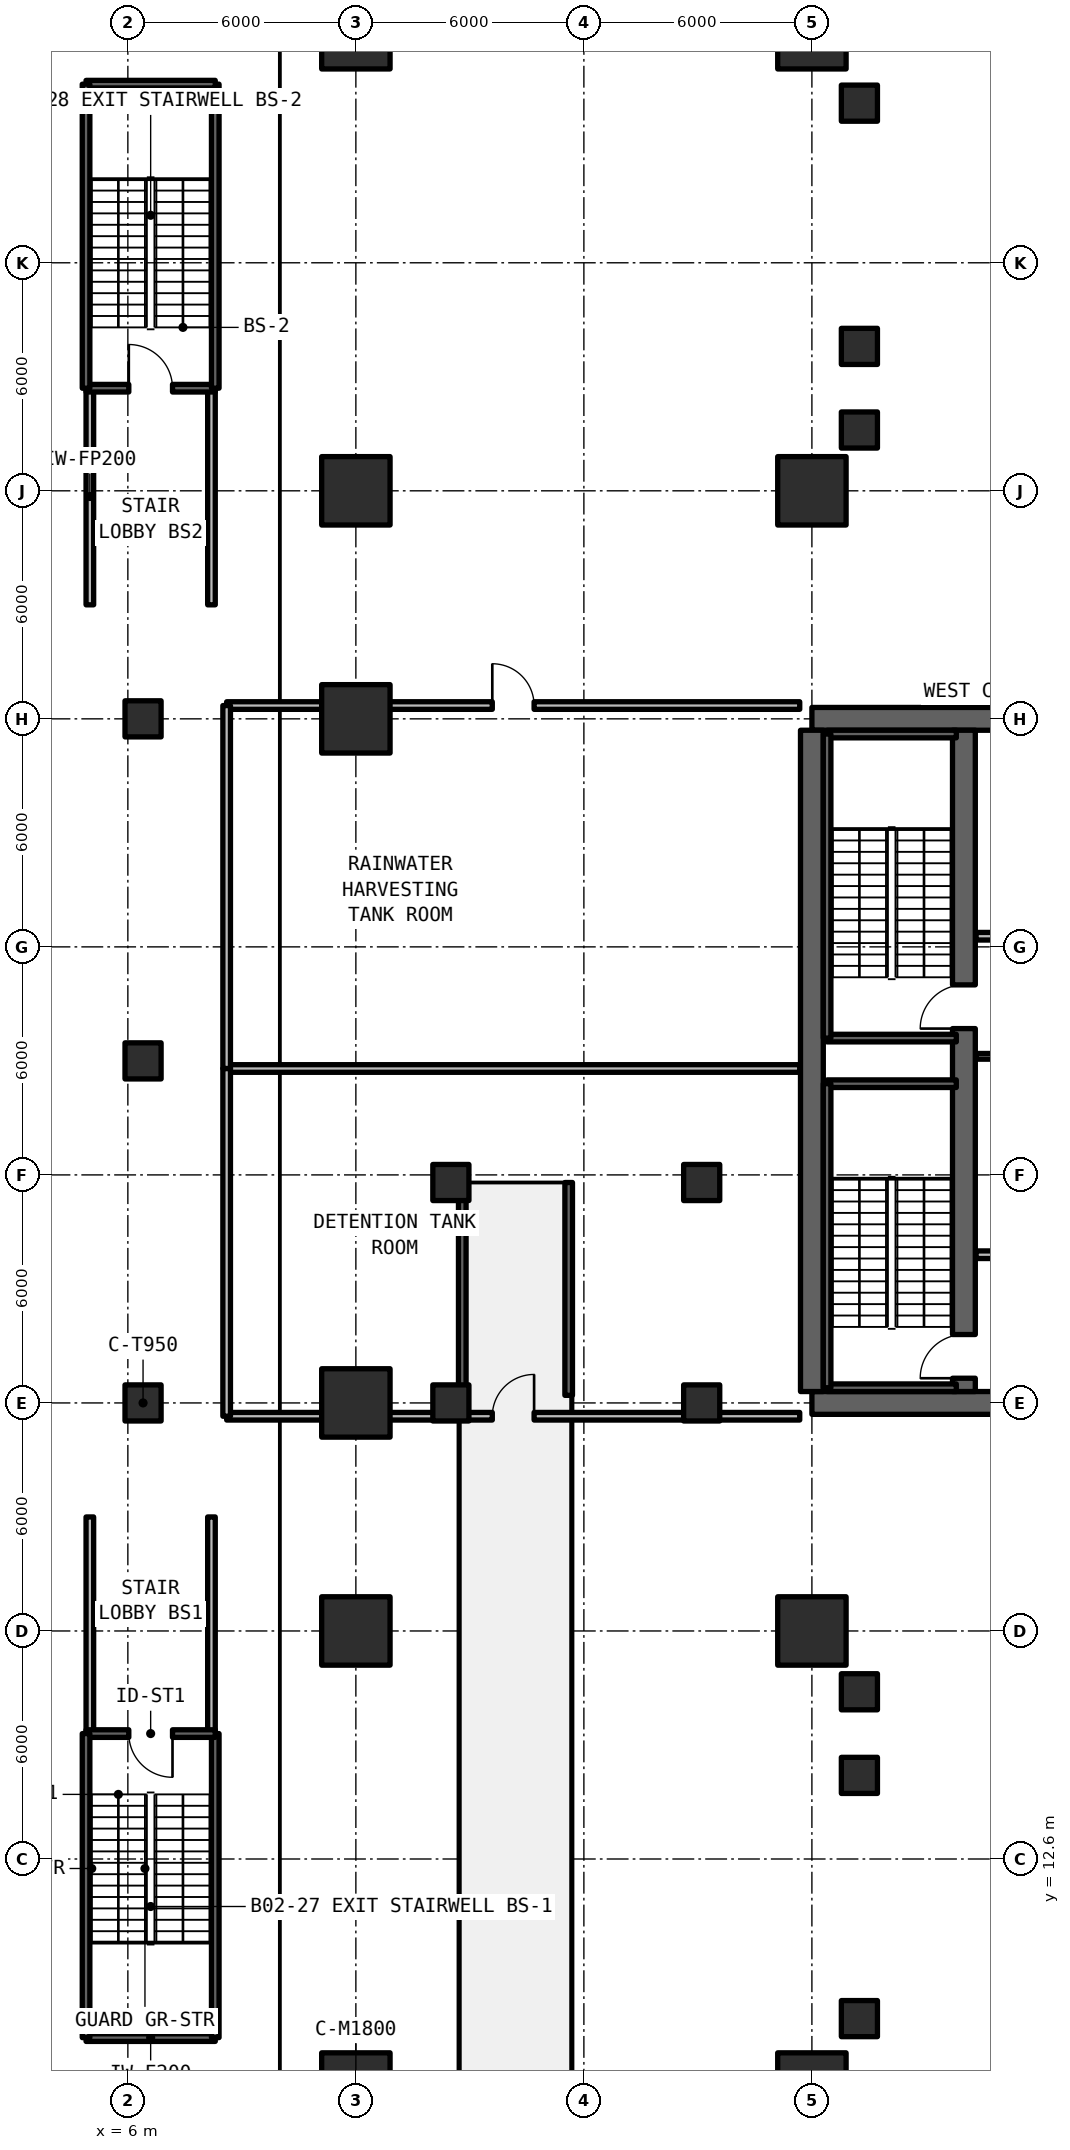
"""IFC4 building model, lengths in metres.
Left out: names, types, materials, properties, quantities, classifications, styles, units other than length and angle.
Written with IfcOpenShell. Run it as: python <this file> out.ifc"""

import sys

from ifc_helpers import new_model, si_unit, direction, frame, frame_2d, origin, origin_2d, place, context, subcontext, project, spatial, rectangle, extrude, element, fill, save


model = new_model("IFC4")
c1 = context("Model", 3, precision=1e-05, world=origin(), true_north=direction((0.0, 1.0)))
c2 = subcontext(c1, "Body", "Model", "MODEL_VIEW")
j1 = project(units=[si_unit("LENGTHUNIT", "METRE"), si_unit("PLANEANGLEUNIT", "RADIAN")], contexts=[c1])
p1 = place(None, origin())
s1 = spatial("IfcSite", under=j1, at=p1, CompositionType="ELEMENT")
p2 = place(p1, origin())
s2 = spatial("IfcBuilding", under=s1, at=p2, CompositionType="ELEMENT")
p3 = place(p2, frame((0.0, 0.0, -9.24)))
s3 = spatial("IfcBuildingStorey", under=s2, at=p3, CompositionType="ELEMENT", Elevation=-9.24)
for number, where, z_axis, x_axis in (
    (1, (24.0, 24.6, 0.0), (0.0, 0.0, 1.0), (1.0, 0.0, 0.0)),
    (2, (36.0, 42.6, 0.0), (0.0, 0.0, 1.0), (-1.0, 0.0, 0.0)),
):
    element("IfcWall", number, at=place(p3, frame(where, z_axis=z_axis, x_axis=x_axis)), inside=s3, PredefinedType="SHEAR", context=c2, shape_type="SweptSolid", body=[
        extrude(rectangle(XDim=12.0, YDim=0.6, at=frame_2d((6.0, 0.0))), origin(), (0.0, 0.0, 1.0), 4.62),
    ])
p4 = place(p3, frame((24.0, 24.9, 0.0), z_axis=(0.0, 0.0, 1.0), x_axis=(0.0, 1.0, 0.0)))
e3 = element("IfcWall", 3, at=p4, inside=s3, PredefinedType="SHEAR", context=c2, shape_type="SweptSolid", body=[
    extrude(rectangle(XDim=17.4, YDim=0.6, at=frame_2d((8.7, 0.0))), origin(), (0.0, 0.0, 1.0), 4.62),
])
p5 = place(p3, frame((28.0, 24.9, 0.0), z_axis=(0.0, 0.0, 1.0), x_axis=(0.0, 1.0, 0.0)))
e4 = element("IfcWall", 4, at=p5, inside=s3, PredefinedType="SHEAR", context=c2, shape_type="SweptSolid", body=[
    extrude(rectangle(XDim=17.4, YDim=0.6, at=frame_2d((8.7, 0.0))), origin(), (0.0, 0.0, 1.0), 4.62),
])
p6 = place(p5, frame((0.35, 0.0, 0.0)))
e5 = element("IfcOpeningElement", 5, at=p6, cuts=e4, PredefinedType="OPENING", context=c2, shape_type="SweptSolid", body=[
    extrude(rectangle(XDim=1.15, YDim=2.15, at=frame_2d((0.575, 1.075))), frame((0.0, 0.31, 0.0), z_axis=(0.0, -1.0, 0.0), x_axis=(1.0, 0.0, 0.0)), (0.0, 0.0, 1.0), 0.62),
])
p7 = place(p5, frame((9.55, 0.0, 0.0)))
e6 = element("IfcOpeningElement", 6, at=p7, cuts=e4, PredefinedType="OPENING", context=c2, shape_type="SweptSolid", body=[
    extrude(rectangle(XDim=1.15, YDim=2.15, at=frame_2d((0.575, 1.075))), frame((0.0, 0.31, 0.0), z_axis=(0.0, -1.0, 0.0), x_axis=(1.0, 0.0, 0.0)), (0.0, 0.0, 1.0), 0.62),
])
for number, where, z_axis, x_axis in (
    (7, (12.0, 6.6, 0.0), (0.0, 0.0, 1.0), (1.0, 0.0, 0.0)),
    (8, (12.0, 24.6, 0.0), (0.0, 0.0, 1.0), (1.0, 0.0, 0.0)),
    (9, (12.0, 42.6, 0.0), (0.0, 0.0, 1.0), (1.0, 0.0, 0.0)),
    (10, (12.0, 60.6, 0.0), (0.0, 0.0, 1.0), (1.0, 0.0, 0.0)),
    (11, (24.0, 6.6, 0.0), (0.0, 0.0, 1.0), (1.0, 0.0, 0.0)),
    (12, (24.0, 60.6, 0.0), (0.0, 0.0, 1.0), (1.0, 0.0, 0.0)),
    (13, (12.0, 18.6, 0.0), (0.0, 0.0, 1.0), (1.0, 0.0, 0.0)),
    (14, (12.0, 48.6, 0.0), (0.0, 0.0, 1.0), (1.0, 0.0, 0.0)),
    (15, (24.0, 18.6, 0.0), (0.0, 0.0, 1.0), (1.0, 0.0, 0.0)),
    (16, (24.0, 48.6, 0.0), (0.0, 0.0, 1.0), (1.0, 0.0, 0.0)),
):
    element("IfcColumn", number, at=place(p3, frame(where, z_axis=z_axis, x_axis=x_axis)), inside=s3, PredefinedType="COLUMN", context=c2, shape_type="SweptSolid", body=[
        extrude(rectangle(XDim=1.8, YDim=1.8, at=origin_2d()), origin(), (0.0, 0.0, 1.0), 4.62),
    ])
for number, where, z_axis, x_axis in (
    (17, (6.4, 24.6, 0.0), (0.0, 0.0, 1.0), (1.0, 0.0, 0.0)),
    (18, (6.4, 42.6, 0.0), (0.0, 0.0, 1.0), (1.0, 0.0, 0.0)),
    (19, (6.4, 33.6, 0.0), (0.0, 0.0, 1.0), (1.0, 0.0, 0.0)),
    (20, (14.5, 30.4, 0.0), (0.0, 0.0, 1.0), (1.0, 0.0, 0.0)),
    (21, (21.1, 30.4, 0.0), (0.0, 0.0, 1.0), (1.0, 0.0, 0.0)),
    (22, (14.5, 24.6, 0.0), (0.0, 0.0, 1.0), (1.0, 0.0, 0.0)),
    (23, (21.1, 24.6, 0.0), (0.0, 0.0, 1.0), (1.0, 0.0, 0.0)),
    (24, (25.25, 14.8, 0.0), (0.0, 0.0, 1.0), (1.0, 0.0, 0.0)),
    (25, (25.25, 8.4, 0.0), (0.0, 0.0, 1.0), (1.0, 0.0, 0.0)),
    (26, (25.25, 17.0, 0.0), (0.0, 0.0, 1.0), (1.0, 0.0, 0.0)),
    (27, (25.25, 52.4, 0.0), (0.0, 0.0, 1.0), (1.0, 0.0, 0.0)),
    (28, (25.25, 50.2, 0.0), (0.0, 0.0, 1.0), (1.0, 0.0, 0.0)),
    (29, (25.25, 58.8, 0.0), (0.0, 0.0, 1.0), (1.0, 0.0, 0.0)),
):
    element("IfcColumn", number, at=place(p3, frame(where, z_axis=z_axis, x_axis=x_axis)), inside=s3, PredefinedType="COLUMN", context=c2, shape_type="SweptSolid", body=[
        extrude(rectangle(XDim=0.95, YDim=0.95, at=origin_2d()), origin(), (0.0, 0.0, 1.0), 4.62),
    ])
p8 = place(p3, frame((28.32, 28.5, 0.0), z_axis=(0.0, 0.0, 1.0), x_axis=(1.0, 0.0, 0.0)))
e30 = element("IfcWall", 30, at=p8, inside=s3, PredefinedType="SOLIDWALL", context=c2, shape_type="SweptSolid", body=[
    extrude(rectangle(XDim=7.36, YDim=0.2, at=frame_2d((3.68, 0.0))), origin(), (0.0, 0.0, 1.0), 3.54),
])
p9 = place(p8, frame((2.88, 0.0, 0.0)))
e31 = element("IfcOpeningElement", 31, at=p9, cuts=e30, PredefinedType="OPENING", context=c2, shape_type="SweptSolid", body=[
    extrude(rectangle(XDim=1.0, YDim=2.15, at=frame_2d((0.5, 1.075))), frame((0.0, 0.11, 0.0), z_axis=(0.0, -1.0, 0.0), x_axis=(1.0, 0.0, 0.0)), (0.0, 0.0, 1.0), 0.22),
])
p10 = place(p3, frame((28.32, 33.72, 0.0), z_axis=(0.0, 0.0, 1.0), x_axis=(1.0, 0.0, 0.0)))
e32 = element("IfcWall", 32, at=p10, inside=s3, PredefinedType="SOLIDWALL", context=c2, shape_type="SweptSolid", body=[
    extrude(rectangle(XDim=2.48, YDim=0.15, at=frame_2d((1.24, 0.0))), origin(), (0.0, 0.0, 1.0), 3.54),
])
p11 = place(p3, frame((28.32, 36.88, 0.0), z_axis=(0.0, 0.0, 1.0), x_axis=(1.0, 0.0, 0.0)))
e33 = element("IfcWall", 33, at=p11, inside=s3, PredefinedType="SOLIDWALL", context=c2, shape_type="SweptSolid", body=[
    extrude(rectangle(XDim=2.48, YDim=0.2, at=frame_2d((1.24, 0.0))), origin(), (0.0, 0.0, 1.0), 3.54),
])
for number, where, z_axis, x_axis in (
    (34, (5.0, 45.6, 0.0), (0.0, 0.0, 1.0), (0.0, 1.0, 0.0)),
    (35, (8.2, 45.6, 0.0), (0.0, 0.0, 1.0), (0.0, 1.0, 0.0)),
):
    element("IfcWall", number, at=place(p3, frame(where, z_axis=z_axis, x_axis=x_axis)), inside=s3, PredefinedType="SOLIDWALL", context=c2, shape_type="SweptSolid", body=[
        extrude(rectangle(XDim=5.7, YDim=0.2, at=frame_2d((2.85, 0.0))), origin(), (0.0, 0.0, 1.0), 3.54),
    ])
for number, where, z_axis, x_axis in (
    (36, (5.0, 15.9, 0.0), (0.0, 0.0, 1.0), (0.0, 1.0, 0.0)),
    (37, (8.2, 15.9, 0.0), (0.0, 0.0, 1.0), (0.0, 1.0, 0.0)),
):
    element("IfcWall", number, at=place(p3, frame(where, z_axis=z_axis, x_axis=x_axis)), inside=s3, PredefinedType="SOLIDWALL", context=c2, shape_type="SweptSolid", body=[
        extrude(rectangle(XDim=5.7, YDim=0.2, at=frame_2d((2.85, 0.0))), origin(), (0.0, 0.0, 1.0), 3.54),
    ])
p12 = place(p3, frame((8.6, 24.25, 0.0), z_axis=(0.0, 0.0, 1.0), x_axis=(1.0, 0.0, 0.0)))
e38 = element("IfcWall", 38, at=p12, inside=s3, PredefinedType="SOLIDWALL", context=c2, shape_type="SweptSolid", body=[
    extrude(rectangle(XDim=15.08, YDim=0.2, at=frame_2d((7.54, 0.0))), origin(), (0.0, 0.0, 1.0), 3.54),
])
p13 = place(p12, frame((6.99, 0.0, 0.0)))
e39 = element("IfcOpeningElement", 39, at=p13, cuts=e38, PredefinedType="OPENING", context=c2, shape_type="SweptSolid", body=[
    extrude(rectangle(XDim=1.1, YDim=2.15, at=frame_2d((0.55, 1.075))), frame((0.0, 0.11, 0.0), z_axis=(0.0, -1.0, 0.0), x_axis=(1.0, 0.0, 0.0)), (0.0, 0.0, 1.0), 0.22),
])
p14 = place(p3, frame((8.6, 33.4, 0.0), z_axis=(0.0, 0.0, 1.0), x_axis=(1.0, 0.0, 0.0)))
e40 = element("IfcWall", 40, at=p14, inside=s3, PredefinedType="SOLIDWALL", context=c2, shape_type="SweptSolid", body=[
    extrude(rectangle(XDim=15.08, YDim=0.2, at=frame_2d((7.54, 0.0))), origin(), (0.0, 0.0, 1.0), 3.54),
])
p15 = place(p3, frame((8.6, 24.25, 0.0), z_axis=(0.0, 0.0, 1.0), x_axis=(0.0, 1.0, 0.0)))
e41 = element("IfcWall", 41, at=p15, inside=s3, PredefinedType="SOLIDWALL", context=c2, shape_type="SweptSolid", body=[
    extrude(rectangle(XDim=9.15, YDim=0.2, at=frame_2d((4.575, 0.0))), origin(), (0.0, 0.0, 1.0), 3.54),
])
p16 = place(p3, frame((8.6, 42.95, 0.0), z_axis=(0.0, 0.0, 1.0), x_axis=(1.0, 0.0, 0.0)))
e42 = element("IfcWall", 42, at=p16, inside=s3, PredefinedType="SOLIDWALL", context=c2, shape_type="SweptSolid", body=[
    extrude(rectangle(XDim=15.08, YDim=0.2, at=frame_2d((7.54, 0.0))), origin(), (0.0, 0.0, 1.0), 3.54),
])
p17 = place(p16, frame((6.99, 0.0, 0.0)))
e43 = element("IfcOpeningElement", 43, at=p17, cuts=e42, PredefinedType="OPENING", context=c2, shape_type="SweptSolid", body=[
    extrude(rectangle(XDim=1.1, YDim=2.15, at=frame_2d((0.55, 1.075))), frame((0.0, 0.11, 0.0), z_axis=(0.0, -1.0, 0.0), x_axis=(1.0, 0.0, 0.0)), (0.0, 0.0, 1.0), 0.22),
])
p18 = place(p3, frame((8.6, 33.4, 0.0), z_axis=(0.0, 0.0, 1.0), x_axis=(0.0, 1.0, 0.0)))
e44 = element("IfcWall", 44, at=p18, inside=s3, PredefinedType="SOLIDWALL", context=c2, shape_type="SweptSolid", body=[
    extrude(rectangle(XDim=9.55, YDim=0.2, at=frame_2d((4.775, 0.0))), origin(), (0.0, 0.0, 1.0), 3.54),
])
for number, where, z_axis, x_axis in (
    (45, (24.4, 25.0, 0.0), (0.0, 0.0, 1.0), (1.0, 0.0, 0.0)),
    (46, (27.8, 33.0, 0.0), (0.0, 0.0, 1.0), (-1.0, 0.0, 0.0)),
):
    element("IfcWall", number, at=place(p3, frame(where, z_axis=z_axis, x_axis=x_axis)), inside=s3, PredefinedType="SOLIDWALL", context=c2, shape_type="SweptSolid", body=[
        extrude(rectangle(XDim=3.4, YDim=0.2, at=frame_2d((1.7, 0.0))), origin(), (0.0, 0.0, 1.0), 4.62),
    ])
p19 = place(p3, frame((24.4, 33.0, 0.0), z_axis=(0.0, 0.0, 1.0), x_axis=(0.0, -1.0, 0.0)))
e47 = element("IfcWall", 47, at=p19, inside=s3, PredefinedType="SOLIDWALL", context=c2, shape_type="SweptSolid", body=[
    extrude(rectangle(XDim=8.0, YDim=0.2, at=frame_2d((4.0, 0.0))), origin(), (0.0, 0.0, 1.0), 4.62),
])
for number, where, z_axis, x_axis in (
    (48, (24.4, 34.2, 0.0), (0.0, 0.0, 1.0), (1.0, 0.0, 0.0)),
    (49, (27.8, 42.2, 0.0), (0.0, 0.0, 1.0), (-1.0, 0.0, 0.0)),
):
    element("IfcWall", number, at=place(p3, frame(where, z_axis=z_axis, x_axis=x_axis)), inside=s3, PredefinedType="SOLIDWALL", context=c2, shape_type="SweptSolid", body=[
        extrude(rectangle(XDim=3.4, YDim=0.2, at=frame_2d((1.7, 0.0))), origin(), (0.0, 0.0, 1.0), 4.62),
    ])
p20 = place(p3, frame((24.4, 42.2, 0.0), z_axis=(0.0, 0.0, 1.0), x_axis=(0.0, -1.0, 0.0)))
e50 = element("IfcWall", 50, at=p20, inside=s3, PredefinedType="SOLIDWALL", context=c2, shape_type="SweptSolid", body=[
    extrude(rectangle(XDim=8.0, YDim=0.2, at=frame_2d((4.0, 0.0))), origin(), (0.0, 0.0, 1.0), 4.62),
])
p21 = place(p3, frame((4.9, 7.9, 0.0), z_axis=(0.0, 0.0, 1.0), x_axis=(1.0, 0.0, 0.0)))
e51 = element("IfcWall", 51, at=p21, inside=s3, PredefinedType="SOLIDWALL", context=c2, shape_type="SweptSolid", body=[
    extrude(rectangle(XDim=3.4, YDim=0.2, at=frame_2d((1.7, 0.0))), origin(), (0.0, 0.0, 1.0), 4.62),
])
p22 = place(p3, frame((8.3, 7.9, 0.0), z_axis=(0.0, 0.0, 1.0), x_axis=(0.0, 1.0, 0.0)))
e52 = element("IfcWall", 52, at=p22, inside=s3, PredefinedType="SOLIDWALL", context=c2, shape_type="SweptSolid", body=[
    extrude(rectangle(XDim=8.0, YDim=0.2, at=frame_2d((4.0, 0.0))), origin(), (0.0, 0.0, 1.0), 4.62),
])
p23 = place(p3, frame((8.3, 15.9, 0.0), z_axis=(0.0, 0.0, 1.0), x_axis=(-1.0, 0.0, 0.0)))
e53 = element("IfcWall", 53, at=p23, inside=s3, PredefinedType="SOLIDWALL", context=c2, shape_type="SweptSolid", body=[
    extrude(rectangle(XDim=3.4, YDim=0.2, at=frame_2d((1.7, 0.0))), origin(), (0.0, 0.0, 1.0), 4.62),
])
p24 = place(p23, frame((1.125, 0.0, 0.0)))
e54 = element("IfcOpeningElement", 54, at=p24, cuts=e53, PredefinedType="OPENING", context=c2, shape_type="SweptSolid", body=[
    extrude(rectangle(XDim=1.15, YDim=2.15, at=frame_2d((0.575, 1.075))), frame((0.0, 0.11, 0.0), z_axis=(0.0, -1.0, 0.0), x_axis=(1.0, 0.0, 0.0)), (0.0, 0.0, 1.0), 0.22),
])
p25 = place(p3, frame((4.9, 15.9, 0.0), z_axis=(0.0, 0.0, 1.0), x_axis=(0.0, -1.0, 0.0)))
e55 = element("IfcWall", 55, at=p25, inside=s3, PredefinedType="SOLIDWALL", context=c2, shape_type="SweptSolid", body=[
    extrude(rectangle(XDim=8.0, YDim=0.2, at=frame_2d((4.0, 0.0))), origin(), (0.0, 0.0, 1.0), 4.62),
])
p26 = place(p3, frame((4.9, 51.3, 0.0), z_axis=(0.0, 0.0, 1.0), x_axis=(1.0, 0.0, 0.0)))
e56 = element("IfcWall", 56, at=p26, inside=s3, PredefinedType="SOLIDWALL", context=c2, shape_type="SweptSolid", body=[
    extrude(rectangle(XDim=3.4, YDim=0.2, at=frame_2d((1.7, 0.0))), origin(), (0.0, 0.0, 1.0), 4.62),
])
p27 = place(p26, frame((1.125, 0.0, 0.0)))
e57 = element("IfcOpeningElement", 57, at=p27, cuts=e56, PredefinedType="OPENING", context=c2, shape_type="SweptSolid", body=[
    extrude(rectangle(XDim=1.15, YDim=2.15, at=frame_2d((0.575, 1.075))), frame((0.0, 0.11, 0.0), z_axis=(0.0, -1.0, 0.0), x_axis=(1.0, 0.0, 0.0)), (0.0, 0.0, 1.0), 0.22),
])
p28 = place(p3, frame((8.3, 51.3, 0.0), z_axis=(0.0, 0.0, 1.0), x_axis=(0.0, 1.0, 0.0)))
e58 = element("IfcWall", 58, at=p28, inside=s3, PredefinedType="SOLIDWALL", context=c2, shape_type="SweptSolid", body=[
    extrude(rectangle(XDim=8.0, YDim=0.2, at=frame_2d((4.0, 0.0))), origin(), (0.0, 0.0, 1.0), 4.62),
])
p29 = place(p3, frame((8.3, 59.3, 0.0), z_axis=(0.0, 0.0, 1.0), x_axis=(-1.0, 0.0, 0.0)))
e59 = element("IfcWall", 59, at=p29, inside=s3, PredefinedType="SOLIDWALL", context=c2, shape_type="SweptSolid", body=[
    extrude(rectangle(XDim=3.4, YDim=0.2, at=frame_2d((1.7, 0.0))), origin(), (0.0, 0.0, 1.0), 4.62),
])
p30 = place(p3, frame((4.9, 59.3, 0.0), z_axis=(0.0, 0.0, 1.0), x_axis=(0.0, -1.0, 0.0)))
e60 = element("IfcWall", 60, at=p30, inside=s3, PredefinedType="SOLIDWALL", context=c2, shape_type="SweptSolid", body=[
    extrude(rectangle(XDim=8.0, YDim=0.2, at=frame_2d((4.0, 0.0))), origin(), (0.0, 0.0, 1.0), 4.62),
])
for number, where, z_axis, x_axis in (
    (61, (14.8, 24.8, 0.0), (0.0, 0.0, 1.0), (0.0, 1.0, 0.0)),
    (62, (17.6, 24.8, 0.0), (0.0, 0.0, 1.0), (0.0, 1.0, 0.0)),
):
    element("IfcWall", number, at=place(p3, frame(where, z_axis=z_axis, x_axis=x_axis)), inside=s3, PredefinedType="SOLIDWALL", context=c2, shape_type="SweptSolid", body=[
        extrude(rectangle(XDim=5.6, YDim=0.2, at=frame_2d((2.8, 0.0))), origin(), (0.0, 0.0, 1.0), 4.37),
    ])
p31 = place(p13, origin())
e63 = element("IfcDoor", 63, at=p31, inside=s3, OperationType="SINGLE_SWING_RIGHT", PredefinedType="DOOR", context=c2, shape_type="SweptSolid", body=[
    extrude(rectangle(XDim=1.1, YDim=2.15, at=frame_2d((0.55, 1.075))), frame((0.0, 0.025, 0.0), z_axis=(0.0, -1.0, 0.0), x_axis=(1.0, 0.0, 0.0)), (0.0, 0.0, 1.0), 0.05),
])
fill(e39, e63)
p32 = place(p17, origin())
e64 = element("IfcDoor", 64, at=p32, inside=s3, OperationType="SINGLE_SWING_LEFT", PredefinedType="DOOR", context=c2, shape_type="SweptSolid", body=[
    extrude(rectangle(XDim=1.1, YDim=2.15, at=frame_2d((0.55, 1.075))), frame((0.0, 0.025, 0.0), z_axis=(0.0, -1.0, 0.0), x_axis=(1.0, 0.0, 0.0)), (0.0, 0.0, 1.0), 0.05),
])
fill(e43, e64)
p33 = place(p6, origin())
e65 = element("IfcDoor", 65, at=p33, inside=s3, OperationType="SINGLE_SWING_LEFT", PredefinedType="DOOR", context=c2, shape_type="SweptSolid", body=[
    extrude(rectangle(XDim=1.15, YDim=2.15, at=frame_2d((0.575, 1.075))), frame((0.0, 0.025, 0.0), z_axis=(0.0, -1.0, 0.0), x_axis=(1.0, 0.0, 0.0)), (0.0, 0.0, 1.0), 0.05),
])
fill(e5, e65)
p34 = place(p7, origin())
e66 = element("IfcDoor", 66, at=p34, inside=s3, OperationType="SINGLE_SWING_RIGHT", PredefinedType="DOOR", context=c2, shape_type="SweptSolid", body=[
    extrude(rectangle(XDim=1.15, YDim=2.15, at=frame_2d((0.575, 1.075))), frame((0.0, 0.025, 0.0), z_axis=(0.0, -1.0, 0.0), x_axis=(1.0, 0.0, 0.0)), (0.0, 0.0, 1.0), 0.05),
])
fill(e6, e66)
p35 = place(p24, origin())
e67 = element("IfcDoor", 67, at=p35, inside=s3, OperationType="SINGLE_SWING_LEFT", PredefinedType="DOOR", context=c2, shape_type="SweptSolid", body=[
    extrude(rectangle(XDim=1.15, YDim=2.15, at=frame_2d((0.575, 1.075))), frame((0.0, 0.025, 0.0), z_axis=(0.0, -1.0, 0.0), x_axis=(1.0, 0.0, 0.0)), (0.0, 0.0, 1.0), 0.05),
])
fill(e54, e67)
p36 = place(p27, origin())
e68 = element("IfcDoor", 68, at=p36, inside=s3, OperationType="SINGLE_SWING_RIGHT", PredefinedType="DOOR", context=c2, shape_type="SweptSolid", body=[
    extrude(rectangle(XDim=1.15, YDim=2.15, at=frame_2d((0.575, 1.075))), frame((0.0, 0.025, 0.0), z_axis=(0.0, -1.0, 0.0), x_axis=(1.0, 0.0, 0.0)), (0.0, 0.0, 1.0), 0.05),
])
fill(e57, e68)
save(model, sys.argv[1])
